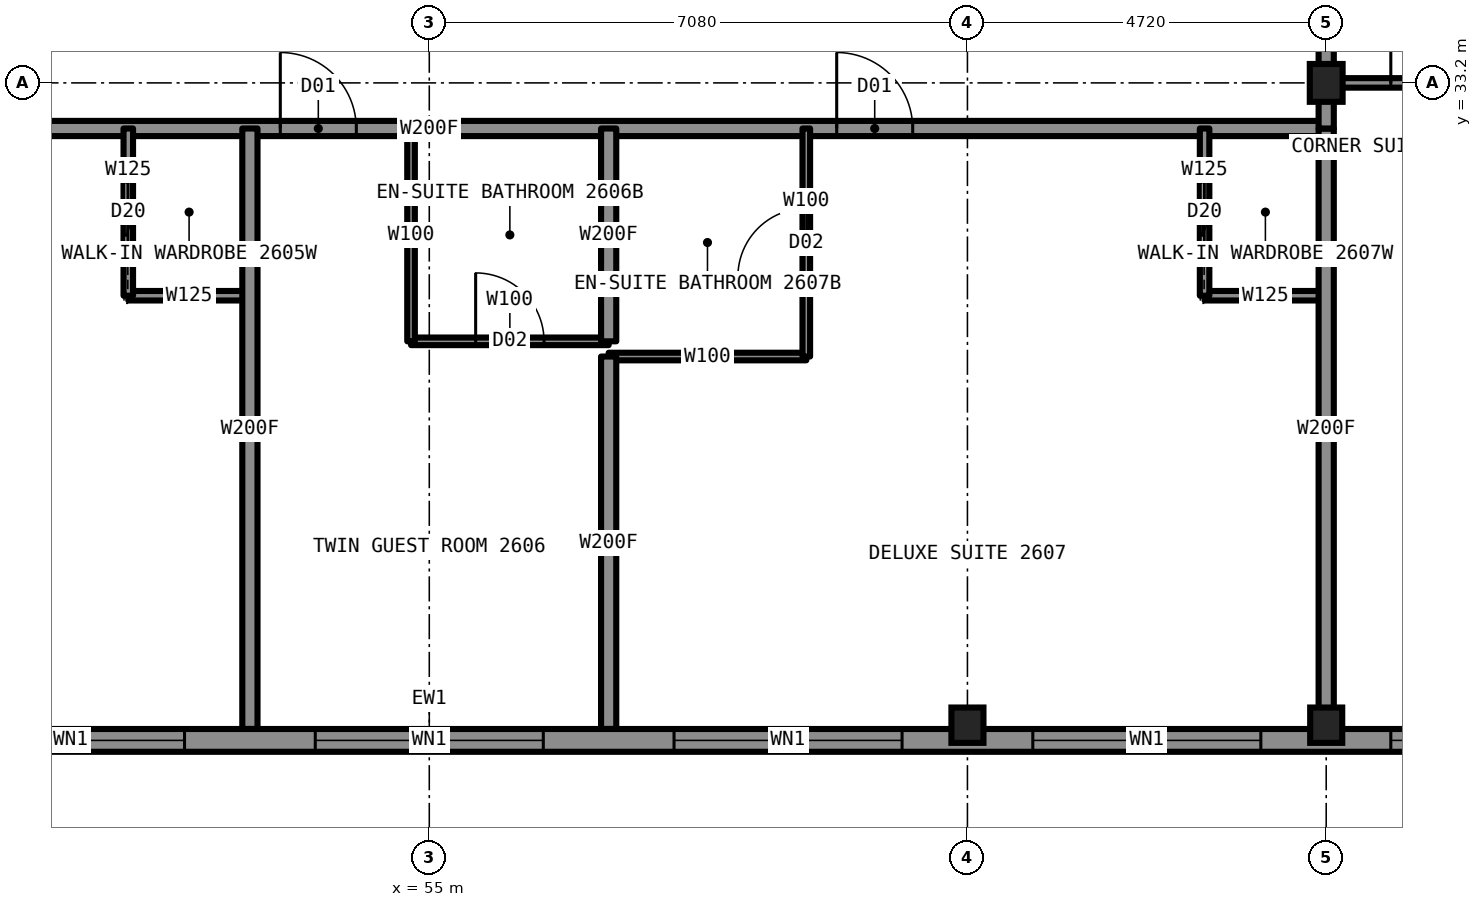
"""IFC4 building model, lengths in metres.
Left out: names, types, materials, properties, quantities, classifications, styles, units other than length and angle.
Written with IfcOpenShell. Run it as: python <this file> out.ifc"""

import sys

from ifc_helpers import new_model, si_unit, direction, frame, frame_2d, origin, origin_2d, place, context, subcontext, project, spatial, rectangle, i_section, extrude, element, fill, save


model = new_model("IFC4")
c1 = context("Model", 3, precision=1e-05, world=origin(), true_north=direction((0.0, 1.0)))
c2 = subcontext(c1, "Body", "Model", "MODEL_VIEW")
j1 = project(units=[si_unit("LENGTHUNIT", "METRE"), si_unit("PLANEANGLEUNIT", "RADIAN")], contexts=[c1])
p1 = place(None, origin())
s1 = spatial("IfcSite", under=j1, at=p1, CompositionType="ELEMENT")
p2 = place(p1, origin())
s2 = spatial("IfcBuilding", under=s1, at=p2, CompositionType="ELEMENT")
p3 = place(p2, frame((0.0, 0.0, 93.4)))
s3 = spatial("IfcBuildingStorey", under=s2, at=p3, CompositionType="ELEMENT", Elevation=93.4)
for number, where, z_axis, x_axis in (
    (1, (62.08, 24.75, 0.0), (0.0, 0.0, 1.0), (1.0, 0.0, 0.0)),
    (2, (66.8, 24.75, 0.0), (0.0, 0.0, 1.0), (1.0, 0.0, 0.0)),
):
    element("IfcColumn", number, at=place(p3, frame(where, z_axis=z_axis, x_axis=x_axis)), inside=s3, PredefinedType="COLUMN", context=c2, shape_type="SweptSolid", body=[
        extrude(i_section(OverallWidth=0.442, OverallDepth=0.531, WebThickness=0.066, FlangeThickness=0.106, at=origin_2d()), origin(), (0.0, 0.0, 1.0), 3.5),
    ])
p4 = place(p3, frame((66.8, 33.2, 0.0), z_axis=(0.0, 0.0, 1.0), x_axis=(1.0, 0.0, 0.0)))
e3 = element("IfcColumn", 3, at=p4, inside=s3, PredefinedType="COLUMN", context=c2, shape_type="SweptSolid", body=[
    extrude(i_section(OverallWidth=0.432, OverallDepth=0.498, WebThickness=0.056, FlangeThickness=0.089, at=origin_2d()), origin(), (0.0, 0.0, 1.0), 3.5),
])
p5 = place(p3, frame((66.8, 33.2, 0.0), z_axis=(0.0, 0.0, 1.0), x_axis=(1.0, 0.0, 0.0)))
e4 = element("IfcWall", 4, at=p5, inside=s3, PredefinedType="PARTITIONING", context=c2, shape_type="SweptSolid", body=[
    extrude(rectangle(XDim=8.5, YDim=0.125, at=frame_2d((4.25, 0.0))), origin(), (0.0, 0.0, 1.0), 2.573),
])
p6 = place(p5, frame((0.85, 0.0, 0.0)))
e5 = element("IfcOpeningElement", 5, at=p6, cuts=e4, PredefinedType="OPENING", context=c2, shape_type="SweptSolid", body=[
    extrude(rectangle(XDim=0.9, YDim=2.2, at=frame_2d((0.45, 1.1))), frame((0.0, 0.073, 0.0), z_axis=(0.0, -1.0, 0.0), x_axis=(1.0, 0.0, 0.0)), (0.0, 0.0, 1.0), 0.145),
])
p7 = place(p3, frame((43.2, 32.6, 0.0), z_axis=(0.0, 0.0, 1.0), x_axis=(1.0, 0.0, 0.0)))
e6 = element("IfcWall", 6, at=p7, inside=s3, PredefinedType="PARTITIONING", context=c2, shape_type="SweptSolid", body=[
    extrude(rectangle(XDim=23.6, YDim=0.2, at=frame_2d((11.8, 0.0))), origin(), (0.0, 0.0, 1.0), 3.33),
])
p8 = place(p7, frame((3.0, 0.0, 0.0)))
e7 = element("IfcOpeningElement", 7, at=p8, cuts=e6, PredefinedType="OPENING", context=c2, shape_type="SweptSolid", body=[
    extrude(rectangle(XDim=1.0, YDim=2.2, at=frame_2d((0.5, 1.1))), frame((0.0, 0.11, 0.0), z_axis=(0.0, -1.0, 0.0), x_axis=(1.0, 0.0, 0.0)), (0.0, 0.0, 1.0), 0.22),
])
p9 = place(p7, frame((9.84, 0.0, 0.0)))
e8 = element("IfcOpeningElement", 8, at=p9, cuts=e6, PredefinedType="OPENING", context=c2, shape_type="SweptSolid", body=[
    extrude(rectangle(XDim=1.0, YDim=2.2, at=frame_2d((0.5, 1.1))), frame((0.0, 0.11, 0.0), z_axis=(0.0, -1.0, 0.0), x_axis=(1.0, 0.0, 0.0)), (0.0, 0.0, 1.0), 0.22),
])
p10 = place(p7, frame((17.16, 0.0, 0.0)))
e9 = element("IfcOpeningElement", 9, at=p10, cuts=e6, PredefinedType="OPENING", context=c2, shape_type="SweptSolid", body=[
    extrude(rectangle(XDim=1.0, YDim=2.2, at=frame_2d((0.5, 1.1))), frame((0.0, 0.11, 0.0), z_axis=(0.0, -1.0, 0.0), x_axis=(1.0, 0.0, 0.0)), (0.0, 0.0, 1.0), 0.22),
])
p11 = place(p3, frame((51.04, 30.4, 0.0), z_axis=(0.0, 0.0, 1.0), x_axis=(1.0, 0.0, 0.0)))
e10 = element("IfcWall", 10, at=p11, inside=s3, PredefinedType="PARTITIONING", context=c2, shape_type="SweptSolid", body=[
    extrude(rectangle(XDim=1.6, YDim=0.125, at=frame_2d((0.8, 0.0))), origin(), (0.0, 0.0, 1.0), 3.33),
])
p12 = place(p3, frame((65.2, 30.4, 0.0), z_axis=(0.0, 0.0, 1.0), x_axis=(1.0, 0.0, 0.0)))
e11 = element("IfcWall", 11, at=p12, inside=s3, PredefinedType="PARTITIONING", context=c2, shape_type="SweptSolid", body=[
    extrude(rectangle(XDim=1.6, YDim=0.125, at=frame_2d((0.8, 0.0))), origin(), (0.0, 0.0, 1.0), 3.33),
])
p13 = place(p3, frame((54.76, 29.8, 0.0), z_axis=(0.0, 0.0, 1.0), x_axis=(1.0, 0.0, 0.0)))
e12 = element("IfcWall", 12, at=p13, inside=s3, PredefinedType="PARTITIONING", context=c2, shape_type="SweptSolid", body=[
    extrude(rectangle(XDim=2.6, YDim=0.1, at=frame_2d((1.3, 0.0))), origin(), (0.0, 0.0, 1.0), 2.731),
])
p14 = place(p13, frame((0.85, 0.0, 0.0)))
e13 = element("IfcOpeningElement", 13, at=p14, cuts=e12, PredefinedType="OPENING", context=c2, shape_type="SweptSolid", body=[
    extrude(rectangle(XDim=0.9, YDim=2.1, at=frame_2d((0.45, 1.05))), frame((0.0, 0.06, 0.0), z_axis=(0.0, -1.0, 0.0), x_axis=(1.0, 0.0, 0.0)), (0.0, 0.0, 1.0), 0.12),
])
p15 = place(p3, frame((57.36, 29.6, 0.0), z_axis=(0.0, 0.0, 1.0), x_axis=(1.0, 0.0, 0.0)))
e14 = element("IfcWall", 14, at=p15, inside=s3, PredefinedType="PARTITIONING", context=c2, shape_type="SweptSolid", body=[
    extrude(rectangle(XDim=2.6, YDim=0.1, at=frame_2d((1.3, 0.0))), origin(), (0.0, 0.0, 1.0), 3.33),
])
p16 = place(p3, frame((54.76, 29.8, 0.0), z_axis=(0.0, 0.0, 1.0), x_axis=(0.0, 1.0, 0.0)))
e15 = element("IfcWall", 15, at=p16, inside=s3, PredefinedType="PARTITIONING", context=c2, shape_type="SweptSolid", body=[
    extrude(rectangle(XDim=2.8, YDim=0.1, at=frame_2d((1.4, 0.0))), origin(), (0.0, 0.0, 1.0), 3.33),
])
p17 = place(p3, frame((52.64, 24.7, 0.0), z_axis=(0.0, 0.0, 1.0), x_axis=(0.0, 1.0, 0.0)))
e16 = element("IfcWall", 16, at=p17, inside=s3, PredefinedType="PARTITIONING", context=c2, shape_type="SweptSolid", body=[
    extrude(rectangle(XDim=7.9, YDim=0.2, at=frame_2d((3.95, 0.0))), origin(), (0.0, 0.0, 1.0), 3.33),
])
p18 = place(p3, frame((51.04, 30.4, 0.0), z_axis=(0.0, 0.0, 1.0), x_axis=(0.0, 1.0, 0.0)))
e17 = element("IfcWall", 17, at=p18, inside=s3, PredefinedType="PARTITIONING", context=c2, shape_type="SweptSolid", body=[
    extrude(rectangle(XDim=2.2, YDim=0.125, at=frame_2d((1.1, 0.0))), origin(), (0.0, 0.0, 1.0), 3.33),
])
p19 = place(p18, frame((0.7, 0.0, 0.0)))
e18 = element("IfcOpeningElement", 18, at=p19, cuts=e17, PredefinedType="OPENING", context=c2, shape_type="SweptSolid", body=[
    extrude(rectangle(XDim=0.8, YDim=2.1, at=frame_2d((0.4, 1.05))), frame((0.0, 0.073, 0.0), z_axis=(0.0, -1.0, 0.0), x_axis=(1.0, 0.0, 0.0)), (0.0, 0.0, 1.0), 0.145),
])
p20 = place(p3, frame((65.2, 30.4, 0.0), z_axis=(0.0, 0.0, 1.0), x_axis=(0.0, 1.0, 0.0)))
e19 = element("IfcWall", 19, at=p20, inside=s3, PredefinedType="PARTITIONING", context=c2, shape_type="SweptSolid", body=[
    extrude(rectangle(XDim=2.2, YDim=0.125, at=frame_2d((1.1, 0.0))), origin(), (0.0, 0.0, 1.0), 3.33),
])
p21 = place(p20, frame((0.7, 0.0, 0.0)))
e20 = element("IfcOpeningElement", 20, at=p21, cuts=e19, PredefinedType="OPENING", context=c2, shape_type="SweptSolid", body=[
    extrude(rectangle(XDim=0.8, YDim=2.1, at=frame_2d((0.4, 1.05))), frame((0.0, 0.073, 0.0), z_axis=(0.0, -1.0, 0.0), x_axis=(1.0, 0.0, 0.0)), (0.0, 0.0, 1.0), 0.145),
])
p22 = place(p3, frame((66.8, 33.22, 0.0), z_axis=(0.0, 0.0, 1.0), x_axis=(0.0, 1.0, 0.0)))
e21 = element("IfcWall", 21, at=p22, inside=s3, PredefinedType="PARTITIONING", context=c2, shape_type="SweptSolid", body=[
    extrude(rectangle(XDim=23.56, YDim=0.2, at=frame_2d((11.78, 0.0))), origin(), (0.0, 0.0, 1.0), 3.33),
])
p23 = place(p22, frame((6.16, 0.0, 0.0)))
e22 = element("IfcOpeningElement", 22, at=p23, cuts=e21, PredefinedType="OPENING", context=c2, shape_type="SweptSolid", body=[
    extrude(rectangle(XDim=1.0, YDim=2.2, at=frame_2d((0.5, 1.1))), frame((0.0, 0.11, 0.0), z_axis=(0.0, -1.0, 0.0), x_axis=(1.0, 0.0, 0.0)), (0.0, 0.0, 1.0), 0.22),
])
p24 = place(p22, frame((12.42, 0.0, 0.0)))
e23 = element("IfcOpeningElement", 23, at=p24, cuts=e21, PredefinedType="OPENING", context=c2, shape_type="SweptSolid", body=[
    extrude(rectangle(XDim=1.0, YDim=2.2, at=frame_2d((0.5, 1.1))), frame((0.0, 0.11, 0.0), z_axis=(0.0, -1.0, 0.0), x_axis=(1.0, 0.0, 0.0)), (0.0, 0.0, 1.0), 0.22),
])
p25 = place(p22, frame((21.82, 0.0, 0.0)))
e24 = element("IfcOpeningElement", 24, at=p25, cuts=e21, PredefinedType="OPENING", context=c2, shape_type="SweptSolid", body=[
    extrude(rectangle(XDim=1.1, YDim=2.2, at=frame_2d((0.55, 1.1))), frame((0.0, 0.11, 0.0), z_axis=(0.0, -1.0, 0.0), x_axis=(1.0, 0.0, 0.0)), (0.0, 0.0, 1.0), 0.22),
])
p26 = place(p22, frame((0.64, 0.0, 0.0)))
e25 = element("IfcOpeningElement", 25, at=p26, cuts=e21, PredefinedType="OPENING", context=c2, shape_type="SweptSolid", body=[
    extrude(rectangle(XDim=1.1, YDim=2.2, at=frame_2d((0.55, 1.1))), frame((0.0, 0.11, 0.0), z_axis=(0.0, -1.0, 0.0), x_axis=(1.0, 0.0, 0.0)), (0.0, 0.0, 1.0), 0.22),
])
p27 = place(p3, frame((66.8, 24.7, 0.0), z_axis=(0.0, 0.0, 1.0), x_axis=(0.0, 1.0, 0.0)))
e26 = element("IfcWall", 26, at=p27, inside=s3, PredefinedType="PARTITIONING", context=c2, shape_type="SweptSolid", body=[
    extrude(rectangle(XDim=7.9, YDim=0.2, at=frame_2d((3.95, 0.0))), origin(), (0.0, 0.0, 1.0), 2.573),
])
p28 = place(p3, frame((57.36, 24.7, 0.0), z_axis=(0.0, 0.0, 1.0), x_axis=(0.0, 1.0, 0.0)))
e27 = element("IfcWall", 27, at=p28, inside=s3, PredefinedType="PARTITIONING", context=c2, shape_type="SweptSolid", body=[
    extrude(rectangle(XDim=4.9, YDim=0.2, at=frame_2d((2.45, 0.0))), origin(), (0.0, 0.0, 1.0), 3.33),
])
p29 = place(p3, frame((57.36, 29.8, 0.0), z_axis=(0.0, 0.0, 1.0), x_axis=(0.0, 1.0, 0.0)))
e28 = element("IfcWall", 28, at=p29, inside=s3, PredefinedType="PARTITIONING", context=c2, shape_type="SweptSolid", body=[
    extrude(rectangle(XDim=2.8, YDim=0.2, at=frame_2d((1.4, 0.0))), origin(), (0.0, 0.0, 1.0), 3.33),
])
p30 = place(p3, frame((59.96, 29.6, 0.0), z_axis=(0.0, 0.0, 1.0), x_axis=(0.0, 1.0, 0.0)))
e29 = element("IfcWall", 29, at=p30, inside=s3, PredefinedType="PARTITIONING", context=c2, shape_type="SweptSolid", body=[
    extrude(rectangle(XDim=3.0, YDim=0.1, at=frame_2d((1.5, 0.0))), origin(), (0.0, 0.0, 1.0), 3.33),
])
p31 = place(p30, frame((1.05, 0.0, 0.0)))
e30 = element("IfcOpeningElement", 30, at=p31, cuts=e29, PredefinedType="OPENING", context=c2, shape_type="SweptSolid", body=[
    extrude(rectangle(XDim=0.9, YDim=2.1, at=frame_2d((0.45, 1.05))), frame((0.0, 0.06, 0.0), z_axis=(0.0, -1.0, 0.0), x_axis=(1.0, 0.0, 0.0)), (0.0, 0.0, 1.0), 0.12),
])
p32 = place(p3, frame((39.9, 24.55, 0.0), z_axis=(0.0, 0.0, 1.0), x_axis=(1.0, 0.0, 0.0)))
e31 = element("IfcWall", 31, at=p32, inside=s3, PredefinedType="SOLIDWALL", context=c2, shape_type="SweptSolid", body=[
    extrude(rectangle(XDim=30.2, YDim=0.3, at=frame_2d((15.1, 0.0))), origin(), (0.0, 0.0, 1.0), 2.83),
])
p33 = place(p32, frame((0.85, 0.0, 0.5)))
e32 = element("IfcOpeningElement", 32, at=p33, cuts=e31, PredefinedType="OPENING", context=c2, shape_type="SweptSolid", body=[
    extrude(rectangle(XDim=1.6, YDim=2.0, at=frame_2d((0.8, 1.0))), frame((0.0, 0.16, 0.0), z_axis=(0.0, -1.0, 0.0), x_axis=(1.0, 0.0, 0.0)), (0.0, 0.0, 1.0), 0.32),
])
p34 = place(p32, frame((4.16, 0.0, 0.5)))
e33 = element("IfcOpeningElement", 33, at=p34, cuts=e31, PredefinedType="OPENING", context=c2, shape_type="SweptSolid", body=[
    extrude(rectangle(XDim=3.0, YDim=2.0, at=frame_2d((1.5, 1.0))), frame((0.0, 0.16, 0.0), z_axis=(0.0, -1.0, 0.0), x_axis=(1.0, 0.0, 0.0)), (0.0, 0.0, 1.0), 0.32),
])
p35 = place(p32, frame((8.88, 0.0, 0.5)))
e34 = element("IfcOpeningElement", 34, at=p35, cuts=e31, PredefinedType="OPENING", context=c2, shape_type="SweptSolid", body=[
    extrude(rectangle(XDim=3.0, YDim=2.0, at=frame_2d((1.5, 1.0))), frame((0.0, 0.16, 0.0), z_axis=(0.0, -1.0, 0.0), x_axis=(1.0, 0.0, 0.0)), (0.0, 0.0, 1.0), 0.32),
])
p36 = place(p32, frame((13.6, 0.0, 0.5)))
e35 = element("IfcOpeningElement", 35, at=p36, cuts=e31, PredefinedType="OPENING", context=c2, shape_type="SweptSolid", body=[
    extrude(rectangle(XDim=3.0, YDim=2.0, at=frame_2d((1.5, 1.0))), frame((0.0, 0.16, 0.0), z_axis=(0.0, -1.0, 0.0), x_axis=(1.0, 0.0, 0.0)), (0.0, 0.0, 1.0), 0.32),
])
p37 = place(p32, frame((18.32, 0.0, 0.5)))
e36 = element("IfcOpeningElement", 36, at=p37, cuts=e31, PredefinedType="OPENING", context=c2, shape_type="SweptSolid", body=[
    extrude(rectangle(XDim=3.0, YDim=2.0, at=frame_2d((1.5, 1.0))), frame((0.0, 0.16, 0.0), z_axis=(0.0, -1.0, 0.0), x_axis=(1.0, 0.0, 0.0)), (0.0, 0.0, 1.0), 0.32),
])
p38 = place(p32, frame((23.04, 0.0, 0.5)))
e37 = element("IfcOpeningElement", 37, at=p38, cuts=e31, PredefinedType="OPENING", context=c2, shape_type="SweptSolid", body=[
    extrude(rectangle(XDim=3.0, YDim=2.0, at=frame_2d((1.5, 1.0))), frame((0.0, 0.16, 0.0), z_axis=(0.0, -1.0, 0.0), x_axis=(1.0, 0.0, 0.0)), (0.0, 0.0, 1.0), 0.32),
])
p39 = place(p32, frame((27.75, 0.0, 0.5)))
e38 = element("IfcOpeningElement", 38, at=p39, cuts=e31, PredefinedType="OPENING", context=c2, shape_type="SweptSolid", body=[
    extrude(rectangle(XDim=1.6, YDim=2.0, at=frame_2d((0.8, 1.0))), frame((0.0, 0.16, 0.0), z_axis=(0.0, -1.0, 0.0), x_axis=(1.0, 0.0, 0.0)), (0.0, 0.0, 1.0), 0.32),
])
p40 = place(p3, frame((66.8, 32.6, 0.0), z_axis=(0.0, 0.0, 1.0), x_axis=(0.0, 1.0, 0.0)))
e39 = element("IfcWall", 39, at=p40, inside=s3, PredefinedType="PARTITIONING", context=c2, shape_type="SweptSolid", body=[
    extrude(rectangle(XDim=0.62, YDim=0.2, at=frame_2d((0.31, 0.0))), origin(), (0.0, 0.0, 1.0), 2.573),
])
p41 = place(p19, origin())
e40 = element("IfcDoor", 40, at=p41, inside=s3, OperationType="SLIDING_TO_LEFT", PredefinedType="DOOR", context=c2, shape_type="SweptSolid", body=[
    extrude(rectangle(XDim=0.8, YDim=2.1, at=frame_2d((0.4, 1.05))), frame((0.0, 0.025, 0.0), z_axis=(0.0, -1.0, 0.0), x_axis=(1.0, 0.0, 0.0)), (0.0, 0.0, 1.0), 0.05),
])
fill(e18, e40)
p42 = place(p9, origin())
e41 = element("IfcDoor", 41, at=p42, inside=s3, OperationType="SINGLE_SWING_LEFT", PredefinedType="DOOR", context=c2, shape_type="SweptSolid", body=[
    extrude(rectangle(XDim=1.0, YDim=2.2, at=frame_2d((0.5, 1.1))), frame((0.0, 0.025, 0.0), z_axis=(0.0, -1.0, 0.0), x_axis=(1.0, 0.0, 0.0)), (0.0, 0.0, 1.0), 0.05),
])
fill(e8, e41)
p43 = place(p14, origin())
e42 = element("IfcDoor", 42, at=p43, inside=s3, OperationType="SINGLE_SWING_RIGHT", PredefinedType="DOOR", context=c2, shape_type="SweptSolid", body=[
    extrude(rectangle(XDim=0.9, YDim=2.1, at=frame_2d((0.45, 1.05))), frame((0.0, 0.025, 0.0), z_axis=(0.0, -1.0, 0.0), x_axis=(1.0, 0.0, 0.0)), (0.0, 0.0, 1.0), 0.05),
])
fill(e13, e42)
p44 = place(p10, origin())
e43 = element("IfcDoor", 43, at=p44, inside=s3, OperationType="SINGLE_SWING_LEFT", PredefinedType="DOOR", context=c2, shape_type="SweptSolid", body=[
    extrude(rectangle(XDim=1.0, YDim=2.2, at=frame_2d((0.5, 1.1))), frame((0.0, 0.025, 0.0), z_axis=(0.0, -1.0, 0.0), x_axis=(1.0, 0.0, 0.0)), (0.0, 0.0, 1.0), 0.05),
])
fill(e9, e43)
p45 = place(p31, origin())
e44 = element("IfcDoor", 44, at=p45, inside=s3, OperationType="SINGLE_SWING_RIGHT", PredefinedType="DOOR", context=c2, shape_type="SweptSolid", body=[
    extrude(rectangle(XDim=0.9, YDim=2.1, at=frame_2d((0.45, 1.05))), frame((0.0, 0.025, 0.0), z_axis=(0.0, -1.0, 0.0), x_axis=(1.0, 0.0, 0.0)), (0.0, 0.0, 1.0), 0.05),
])
fill(e30, e44)
p46 = place(p21, origin())
e45 = element("IfcDoor", 45, at=p46, inside=s3, OperationType="SLIDING_TO_LEFT", PredefinedType="DOOR", context=c2, shape_type="SweptSolid", body=[
    extrude(rectangle(XDim=0.8, YDim=2.1, at=frame_2d((0.4, 1.05))), frame((0.0, 0.025, 0.0), z_axis=(0.0, -1.0, 0.0), x_axis=(1.0, 0.0, 0.0)), (0.0, 0.0, 1.0), 0.05),
])
fill(e20, e45)
p47 = place(p6, origin())
e46 = element("IfcDoor", 46, at=p47, inside=s3, OperationType="SINGLE_SWING_LEFT", PredefinedType="DOOR", context=c2, shape_type="SweptSolid", body=[
    extrude(rectangle(XDim=0.9, YDim=2.2, at=frame_2d((0.45, 1.1))), frame((0.0, 0.025, 0.0), z_axis=(0.0, -1.0, 0.0), x_axis=(1.0, 0.0, 0.0)), (0.0, 0.0, 1.0), 0.05),
])
fill(e5, e46)
p48 = place(p35, origin())
e47 = element("IfcWindow", 47, at=p48, inside=s3, PartitioningType="SINGLE_PANEL", PredefinedType="WINDOW", context=c2, shape_type="SweptSolid", body=[
    extrude(rectangle(XDim=3.0, YDim=2.0, at=frame_2d((1.5, 1.0))), frame((0.0, 0.03, 0.0), z_axis=(0.0, -1.0, 0.0), x_axis=(1.0, 0.0, 0.0)), (0.0, 0.0, 1.0), 0.06),
])
fill(e34, e47)
p49 = place(p36, origin())
e48 = element("IfcWindow", 48, at=p49, inside=s3, PartitioningType="SINGLE_PANEL", PredefinedType="WINDOW", context=c2, shape_type="SweptSolid", body=[
    extrude(rectangle(XDim=3.0, YDim=2.0, at=frame_2d((1.5, 1.0))), frame((0.0, 0.03, 0.0), z_axis=(0.0, -1.0, 0.0), x_axis=(1.0, 0.0, 0.0)), (0.0, 0.0, 1.0), 0.06),
])
fill(e35, e48)
p50 = place(p37, origin())
e49 = element("IfcWindow", 49, at=p50, inside=s3, PartitioningType="SINGLE_PANEL", PredefinedType="WINDOW", context=c2, shape_type="SweptSolid", body=[
    extrude(rectangle(XDim=3.0, YDim=2.0, at=frame_2d((1.5, 1.0))), frame((0.0, 0.03, 0.0), z_axis=(0.0, -1.0, 0.0), x_axis=(1.0, 0.0, 0.0)), (0.0, 0.0, 1.0), 0.06),
])
fill(e36, e49)
p51 = place(p38, origin())
e50 = element("IfcWindow", 50, at=p51, inside=s3, PartitioningType="SINGLE_PANEL", PredefinedType="WINDOW", context=c2, shape_type="SweptSolid", body=[
    extrude(rectangle(XDim=3.0, YDim=2.0, at=frame_2d((1.5, 1.0))), frame((0.0, 0.03, 0.0), z_axis=(0.0, -1.0, 0.0), x_axis=(1.0, 0.0, 0.0)), (0.0, 0.0, 1.0), 0.06),
])
fill(e37, e50)
p52 = place(p39, origin())
e51 = element("IfcWindow", 51, at=p52, inside=s3, PartitioningType="SINGLE_PANEL", PredefinedType="WINDOW", context=c2, shape_type="SweptSolid", body=[
    extrude(rectangle(XDim=1.6, YDim=2.0, at=frame_2d((0.8, 1.0))), frame((0.0, 0.03, 0.0), z_axis=(0.0, -1.0, 0.0), x_axis=(1.0, 0.0, 0.0)), (0.0, 0.0, 1.0), 0.06),
])
fill(e38, e51)
save(model, sys.argv[1])
